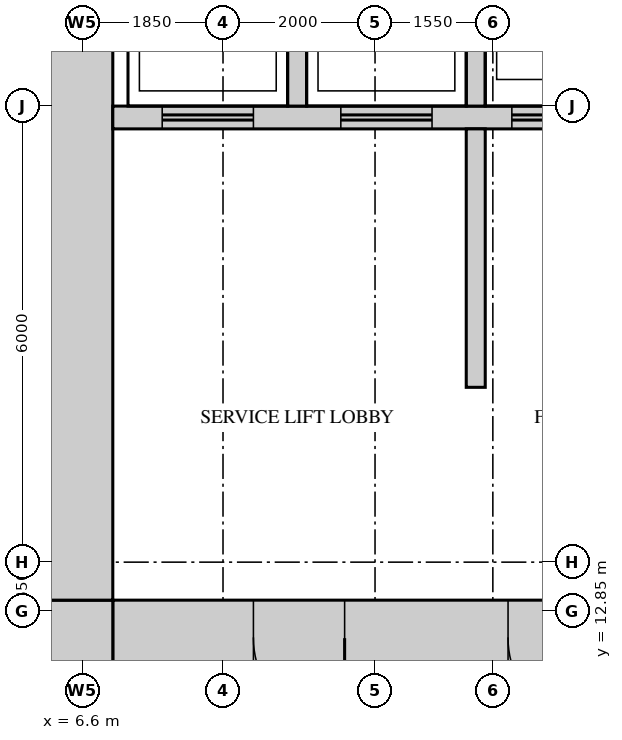
"""IFC4 building model, lengths in metres.
Left out: names, types, materials, properties, quantities, classifications, styles, units other than length and angle.
Written with IfcOpenShell. Run it as: python <this file> out.ifc"""

import sys

from ifc_helpers import new_model, si_unit, direction, frame, frame_2d, origin, place, context, subcontext, project, spatial, rectangle, extrude, source, transform, mapped, element, fill, save


model = new_model("IFC4")
c1 = context("Model", 3, precision=1e-05, world=origin(), true_north=direction((0.0, 1.0)))
c2 = subcontext(c1, "Body", "Model", "MODEL_VIEW")
j1 = project(units=[si_unit("LENGTHUNIT", "METRE"), si_unit("PLANEANGLEUNIT", "RADIAN")], contexts=[c1])
p1 = place(None, origin())
s1 = spatial("IfcSite", under=j1, at=p1, CompositionType="ELEMENT")
p2 = place(p1, origin())
s2 = spatial("IfcBuilding", under=s1, at=p2, CompositionType="ELEMENT")
p3 = place(p2, frame((0.0, 0.0, 105.9)))
s3 = spatial("IfcBuildingStorey", under=s2, at=p3, CompositionType="ELEMENT", Elevation=105.9)
m1 = source(origin(), c2, "Body", "SweptSolid", [
    extrude(rectangle(XDim=6.9, YDim=1.0, at=frame_2d((3.45, 0.0))), origin(), (0.0, 0.0, 1.0), 4.1),
])
p4 = place(p3, frame((7.0, 12.5, 0.0), z_axis=(0.0, 0.0, 1.0), x_axis=(1.0, 0.0, 0.0)))
e1 = element("IfcWall", 1, at=p4, inside=s3, PredefinedType="SHEAR", context=c2, shape_type="MappedRepresentation", body=[
    mapped(m1, transform((0.0, 0.0, 0.0))),
])
m2 = source(origin(), c2, "Body", "SweptSolid", [
    extrude(rectangle(XDim=1.2, YDim=2.1, at=frame_2d((0.6, 1.05))), frame((0.0, 0.51, 0.0), z_axis=(0.0, -1.0, 0.0), x_axis=(1.0, 0.0, 0.0)), (0.0, 0.0, 1.0), 1.02),
])
p5 = place(p4, frame((5.2, 0.0, 0.0)))
e2 = element("IfcOpeningElement", 2, at=p5, cuts=e1, PredefinedType="OPENING", context=c2, shape_type="MappedRepresentation", body=[
    mapped(m2, transform((0.0, 0.0, 0.0))),
])
p6 = place(p4, frame((1.85, 0.0, 0.0)))
e3 = element("IfcOpeningElement", 3, at=p6, cuts=e1, PredefinedType="OPENING", context=c2, shape_type="MappedRepresentation", body=[
    mapped(m2, transform((0.0, 0.0, 0.0))),
])
m3 = source(origin(), c2, "Body", "SweptSolid", [
    extrude(rectangle(XDim=1.0, YDim=1.0, at=frame_2d((0.5, 0.0))), origin(), (0.0, 0.0, 1.0), 4.1),
])
p7 = place(p3, frame((6.0, 12.5, 0.0), z_axis=(0.0, 0.0, 1.0), x_axis=(1.0, 0.0, 0.0)))
e4 = element("IfcWall", 4, at=p7, inside=s3, PredefinedType="SHEAR", context=c2, shape_type="MappedRepresentation", body=[
    mapped(m3, transform((0.0, 0.0, 0.0))),
])
m4 = source(origin(), c2, "Body", "SweptSolid", [
    extrude(rectangle(XDim=28.0, YDim=1.0, at=frame_2d((14.0, 0.0))), origin(), (0.0, 0.0, 1.0), 4.1),
])
p8 = place(p3, frame((6.5, 13.0, 0.0), z_axis=(0.0, 0.0, 1.0), x_axis=(0.0, 1.0, 0.0)))
e5 = element("IfcWall", 5, at=p8, inside=s3, PredefinedType="SHEAR", context=c2, shape_type="MappedRepresentation", body=[
    mapped(m4, transform((0.0, 0.0, 0.0))),
])
m5 = source(origin(), c2, "Body", "SweptSolid", [
    extrude(rectangle(XDim=9.075, YDim=0.3, at=frame_2d((4.538, 0.0))), origin(), (0.0, 0.0, 1.0), 4.1),
])
p9 = place(p3, frame((7.0, 19.35, 0.0), z_axis=(0.0, 0.0, 1.0), x_axis=(1.0, 0.0, 0.0)))
e6 = element("IfcWall", 6, at=p9, inside=s3, PredefinedType="STANDARD", context=c2, shape_type="MappedRepresentation", body=[
    mapped(m5, transform((0.0, 0.0, 0.0))),
])
m6 = source(origin(), c2, "Body", "SweptSolid", [
    extrude(rectangle(XDim=1.2, YDim=2.1, at=frame_2d((0.6, 1.05))), frame((0.0, 0.16, 0.0), z_axis=(0.0, -1.0, 0.0), x_axis=(1.0, 0.0, 0.0)), (0.0, 0.0, 1.0), 0.32),
])
p10 = place(p9, frame((0.65, 0.0, 0.0)))
e7 = element("IfcOpeningElement", 7, at=p10, cuts=e6, PredefinedType="OPENING", context=c2, shape_type="MappedRepresentation", body=[
    mapped(m6, transform((0.0, 0.0, 0.0))),
])
p11 = place(p9, frame((3.0, 0.0, 0.0)))
e8 = element("IfcOpeningElement", 8, at=p11, cuts=e6, PredefinedType="OPENING", context=c2, shape_type="MappedRepresentation", body=[
    mapped(m6, transform((0.0, 0.0, 0.0))),
])
p12 = place(p9, frame((5.25, 0.0, 0.0)))
e9 = element("IfcOpeningElement", 9, at=p12, cuts=e6, PredefinedType="OPENING", context=c2, shape_type="MappedRepresentation", body=[
    mapped(m6, transform((0.0, 0.0, 0.0))),
])
p13 = place(p9, frame((7.4, 0.0, 0.0)))
e10 = element("IfcOpeningElement", 10, at=p13, cuts=e6, PredefinedType="OPENING", context=c2, shape_type="MappedRepresentation", body=[
    mapped(m6, transform((0.0, 0.0, 0.0))),
])
m7 = source(origin(), c2, "Body", "SweptSolid", [
    extrude(rectangle(XDim=3.1, YDim=0.25, at=frame_2d((1.55, 0.0))), origin(), (0.0, 0.0, 1.0), 4.1),
])
for number, where, z_axis, x_axis in (
    (11, (9.425, 19.5, 0.0), (0.0, 0.0, 1.0), (0.0, 1.0, 0.0)),
    (12, (11.775, 19.5, 0.0), (0.0, 0.0, 1.0), (0.0, 1.0, 0.0)),
):
    element("IfcWall", number, at=place(p3, frame(where, z_axis=z_axis, x_axis=x_axis)), inside=s3, PredefinedType="STANDARD", context=c2, shape_type="MappedRepresentation", body=[
        mapped(m7, transform((0.0, 0.0, 0.0))),
    ])
m8 = source(origin(), c2, "Body", "SweptSolid", [
    extrude(rectangle(XDim=3.4, YDim=0.25, at=frame_2d((1.7, 0.0))), origin(), (0.0, 0.0, 1.0), 4.1),
])
p14 = place(p3, frame((11.775, 15.8, 0.0), z_axis=(0.0, 0.0, 1.0), x_axis=(0.0, 1.0, 0.0)))
e13 = element("IfcWall", 13, at=p14, inside=s3, PredefinedType="STANDARD", context=c2, shape_type="MappedRepresentation", body=[
    mapped(m8, transform((0.0, 0.0, 0.0))),
])
m9 = source(origin(), c2, "Body", "SweptSolid", [
    extrude(rectangle(XDim=1.2, YDim=2.1, at=frame_2d((0.6, 1.05))), frame((0.0, 0.45, 0.0), z_axis=(0.0, -1.0, 0.0), x_axis=(1.0, 0.0, 0.0)), (0.0, 0.0, 1.0), 0.9),
])
p15 = place(p5, origin())
e14 = element("IfcDoor", 14, at=p15, inside=s3, OperationType="SINGLE_SWING_RIGHT", PredefinedType="DOOR", context=c2, shape_type="MappedRepresentation", body=[
    mapped(m9, transform((0.0, 0.0, 0.0))),
])
fill(e2, e14)
p16 = place(p6, origin())
e15 = element("IfcDoor", 15, at=p16, inside=s3, OperationType="SINGLE_SWING_RIGHT", PredefinedType="DOOR", context=c2, shape_type="MappedRepresentation", body=[
    mapped(m9, transform((0.0, 0.0, 0.0))),
])
fill(e3, e15)
m10 = source(origin(), c2, "Body", "SweptSolid", [
    extrude(rectangle(XDim=1.2, YDim=2.1, at=frame_2d((0.6, 1.05))), frame((0.0, 0.025, 0.0), z_axis=(0.0, -1.0, 0.0), x_axis=(1.0, 0.0, 0.0)), (0.0, 0.0, 1.0), 0.05),
])
p17 = place(p10, origin())
e16 = element("IfcDoor", 16, at=p17, inside=s3, OperationType="DOUBLE_DOOR_SLIDING", PredefinedType="DOOR", context=c2, shape_type="MappedRepresentation", body=[
    mapped(m10, transform((0.0, 0.0, 0.0))),
])
fill(e7, e16)
p18 = place(p11, origin())
e17 = element("IfcDoor", 17, at=p18, inside=s3, OperationType="DOUBLE_DOOR_SLIDING", PredefinedType="DOOR", context=c2, shape_type="MappedRepresentation", body=[
    mapped(m10, transform((0.0, 0.0, 0.0))),
])
fill(e8, e17)
p19 = place(p12, origin())
e18 = element("IfcDoor", 18, at=p19, inside=s3, OperationType="DOUBLE_DOOR_SLIDING", PredefinedType="DOOR", context=c2, shape_type="MappedRepresentation", body=[
    mapped(m10, transform((0.0, 0.0, 0.0))),
])
fill(e9, e18)
save(model, sys.argv[1])
